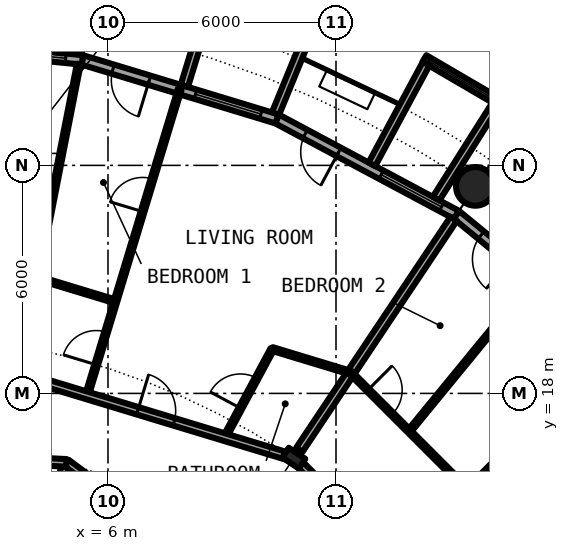
"""IFC4 building model, lengths in metres.
Left out: names, types, materials, properties, quantities, classifications, styles, units other than length and angle.
Written with IfcOpenShell. Run it as: python <this file> out.ifc"""

import sys

from ifc_helpers import new_model, si_unit, direction, frame, frame_2d, origin, origin_2d, place, context, subcontext, project, spatial, rectangle, circle, hollow_circle, i_section, extrude, element, fill, save


model = new_model("IFC4")
c1 = context("Model", 3, precision=1e-05, world=origin(), true_north=direction((0.0, 1.0)))
c2 = subcontext(c1, "Body", "Model", "MODEL_VIEW")
j1 = project(units=[si_unit("LENGTHUNIT", "METRE"), si_unit("PLANEANGLEUNIT", "RADIAN")], contexts=[c1])
p1 = place(None, origin())
s1 = spatial("IfcSite", under=j1, at=p1, CompositionType="ELEMENT")
p2 = place(p1, origin())
s2 = spatial("IfcBuilding", under=s1, at=p2, CompositionType="ELEMENT")
p3 = place(p2, frame((0.0, 0.0, 91.05)))
s3 = spatial("IfcBuildingStorey", under=s2, at=p3, CompositionType="ELEMENT", Elevation=91.05)
p4 = place(p3, frame((15.667, 23.448, 0.0), z_axis=(0.0, 0.0, 1.0), x_axis=(1.0, 0.0, 0.0)))
e1 = element("IfcColumn", 1, at=p4, inside=s3, PredefinedType="COLUMN", context=c2, shape_type="SweptSolid", body=[
    extrude(hollow_circle(Radius=0.508, WallThickness=0.04, at=origin_2d()), origin(), (0.0, 0.0, 1.0), 3.05),
])
p5 = place(p3, frame((10.889, 16.297, 0.0), z_axis=(0.0, 0.0, 1.0), x_axis=(0.55557023302, 0.831469612303, 0.0)))
e2 = element("IfcColumn", 2, at=p5, inside=s3, PredefinedType="COLUMN", context=c2, shape_type="SweptSolid", body=[
    extrude(i_section(OverallWidth=0.306, OverallDepth=0.524, WebThickness=0.021, FlangeThickness=0.04, FilletRadius=0.027, at=origin_2d()), origin(), (0.0, 0.0, 1.0), 3.05),
])
p6 = place(p3, frame((19.304, 19.304, 0.0), z_axis=(0.0, 0.0, 1.0), x_axis=(-0.773019449054, 0.634382322723, 0.0)))
e3 = element("IfcWall", 3, at=p6, inside=s3, PredefinedType="SOLIDWALL", context=c2, shape_type="SweptSolid", body=[
    extrude(rectangle(XDim=5.352, YDim=0.25, at=frame_2d((2.676, 0.0))), origin(), (0.0, 0.0, 1.0), 2.7),
])
p7 = place(p6, frame((0.441, 0.0, 0.3)))
e4 = element("IfcOpeningElement", 4, at=p7, cuts=e3, PredefinedType="OPENING", context=c2, shape_type="SweptSolid", body=[
    extrude(rectangle(XDim=1.8, YDim=2.1, at=frame_2d((0.9, 1.05))), frame((0.0, 0.135, 0.0), z_axis=(0.0, -1.0, 0.0), x_axis=(1.0, 0.0, 0.0)), (0.0, 0.0, 1.0), 0.27),
])
p8 = place(p6, frame((3.51, 0.0, 0.0)))
e5 = element("IfcOpeningElement", 5, at=p8, cuts=e3, PredefinedType="OPENING", context=c2, shape_type="SweptSolid", body=[
    extrude(rectangle(XDim=1.0, YDim=2.2, at=frame_2d((0.5, 1.1))), frame((0.0, 0.135, 0.0), z_axis=(0.0, -1.0, 0.0), x_axis=(1.0, 0.0, 0.0)), (0.0, 0.0, 1.0), 0.27),
])
p9 = place(p3, frame((15.167, 22.699, 0.0), z_axis=(0.0, 0.0, 1.0), x_axis=(-0.881915646801, 0.471407246368, 0.0)))
e6 = element("IfcWall", 6, at=p9, inside=s3, PredefinedType="SOLIDWALL", context=c2, shape_type="SweptSolid", body=[
    extrude(rectangle(XDim=5.352, YDim=0.25, at=frame_2d((2.676, 0.0))), origin(), (0.0, 0.0, 1.0), 2.7),
])
p10 = place(p9, frame((0.441, 0.0, 0.3)))
e7 = element("IfcOpeningElement", 7, at=p10, cuts=e6, PredefinedType="OPENING", context=c2, shape_type="SweptSolid", body=[
    extrude(rectangle(XDim=1.8, YDim=2.1, at=frame_2d((0.9, 1.05))), frame((0.0, 0.135, 0.0), z_axis=(0.0, -1.0, 0.0), x_axis=(1.0, 0.0, 0.0)), (0.0, 0.0, 1.0), 0.27),
])
p11 = place(p9, frame((3.51, 0.0, 0.0)))
e8 = element("IfcOpeningElement", 8, at=p11, cuts=e6, PredefinedType="OPENING", context=c2, shape_type="SweptSolid", body=[
    extrude(rectangle(XDim=1.0, YDim=2.2, at=frame_2d((0.5, 1.1))), frame((0.0, 0.135, 0.0), z_axis=(0.0, -1.0, 0.0), x_axis=(1.0, 0.0, 0.0)), (0.0, 0.0, 1.0), 0.27),
])
p12 = place(p3, frame((16.344, 25.633, -0.03), z_axis=(0.0, 0.0, 1.0), x_axis=(-0.863346521872, 0.504611517081, 0.0)))
e9 = element("IfcWall", 9, at=p12, inside=s3, PredefinedType="SOLIDWALL", context=c2, shape_type="SweptSolid", body=[
    extrude(rectangle(XDim=2.336, YDim=0.2, at=frame_2d((1.168, 0.0))), origin(), (0.0, 0.0, 1.0), 2.73),
])
p13 = place(p12, frame((0.128, 0.0, 0.33)))
e10 = element("IfcOpeningElement", 10, at=p13, cuts=e9, PredefinedType="OPENING", context=c2, shape_type="SweptSolid", body=[
    extrude(circle(Radius=1.04, at=frame_2d((1.04, 1.04))), frame((0.0, 0.11, 0.0), z_axis=(0.0, -1.0, 0.0), x_axis=(1.0, 0.0, 0.0)), (0.0, 0.0, 1.0), 0.22),
])
p14 = place(p3, frame((14.635, 23.126, -0.03), z_axis=(0.0, 0.0, 1.0), x_axis=(0.534437802731, 0.845207805816, 0.0)))
e11 = element("IfcWall", 11, at=p14, inside=s3, PredefinedType="SOLIDWALL", context=c2, shape_type="SweptSolid", body=[
    extrude(rectangle(XDim=2.932, YDim=0.2, at=frame_2d((1.466, 0.0))), origin(), (0.0, 0.0, 1.0), 2.73),
])
p15 = place(p3, frame((12.945, 24.029, -0.03), z_axis=(0.0, 0.0, 1.0), x_axis=(0.474424310775, 0.88029629861, 0.0)))
e12 = element("IfcWall", 12, at=p15, inside=s3, PredefinedType="SOLIDWALL", context=c2, shape_type="SweptSolid", body=[
    extrude(rectangle(XDim=3.006, YDim=0.2, at=frame_2d((1.503, 0.0))), origin(), (0.0, 0.0, 1.0), 2.73),
])
p16 = place(p3, frame((10.447, 25.222, 0.0), z_axis=(0.0, 0.0, 1.0), x_axis=(-0.956965678721, 0.290201119486, 0.0)))
e13 = element("IfcWall", 13, at=p16, inside=s3, PredefinedType="SOLIDWALL", context=c2, shape_type="SweptSolid", body=[
    extrude(rectangle(XDim=5.351, YDim=0.25, at=frame_2d((2.676, 0.0))), origin(), (0.0, 0.0, 1.0), 2.7),
])
p17 = place(p16, frame((0.441, 0.0, 0.3)))
e14 = element("IfcOpeningElement", 14, at=p17, cuts=e13, PredefinedType="OPENING", context=c2, shape_type="SweptSolid", body=[
    extrude(rectangle(XDim=1.8, YDim=2.1, at=frame_2d((0.9, 1.05))), frame((0.0, 0.135, 0.0), z_axis=(0.0, -1.0, 0.0), x_axis=(1.0, 0.0, 0.0)), (0.0, 0.0, 1.0), 0.27),
])
p18 = place(p16, frame((3.51, 0.0, 0.0)))
e15 = element("IfcOpeningElement", 15, at=p18, cuts=e13, PredefinedType="OPENING", context=c2, shape_type="SweptSolid", body=[
    extrude(rectangle(XDim=1.0, YDim=2.2, at=frame_2d((0.5, 1.1))), frame((0.0, 0.135, 0.0), z_axis=(0.0, -1.0, 0.0), x_axis=(1.0, 0.0, 0.0)), (0.0, 0.0, 1.0), 0.27),
])
p19 = place(p3, frame((10.409, 25.364, -0.03), z_axis=(0.0, 0.0, 1.0), x_axis=(0.379509886562, 0.925187681501, 0.0)))
e16 = element("IfcWall", 16, at=p19, inside=s3, PredefinedType="SOLIDWALL", context=c2, shape_type="SweptSolid", body=[
    extrude(rectangle(XDim=2.883, YDim=0.2, at=frame_2d((1.441, 0.0))), origin(), (0.0, 0.0, 1.0), 2.73),
])
p20 = place(p3, frame((8.009, 26.092, -0.03), z_axis=(0.0, 0.0, 1.0), x_axis=(0.293406695073, 0.955987715029, 0.0)))
e17 = element("IfcWall", 17, at=p20, inside=s3, PredefinedType="SOLIDWALL", context=c2, shape_type="SweptSolid", body=[
    extrude(rectangle(XDim=3.006, YDim=0.2, at=frame_2d((1.503, 0.0))), origin(), (0.0, 0.0, 1.0), 2.73),
])
p21 = place(p3, frame((5.326, 26.775, 0.0), z_axis=(0.0, 0.0, 1.0), x_axis=(-0.995173996315, 0.098126026407, 0.0)))
e18 = element("IfcWall", 18, at=p21, inside=s3, PredefinedType="SOLIDWALL", context=c2, shape_type="SweptSolid", body=[
    extrude(rectangle(XDim=5.352, YDim=0.25, at=frame_2d((2.676, 0.0))), origin(), (0.0, 0.0, 1.0), 2.7),
])
p22 = place(p21, frame((0.441, 0.0, 0.3)))
e19 = element("IfcOpeningElement", 19, at=p22, cuts=e18, PredefinedType="OPENING", context=c2, shape_type="SweptSolid", body=[
    extrude(rectangle(XDim=1.8, YDim=2.1, at=frame_2d((0.9, 1.05))), frame((0.0, 0.135, 0.0), z_axis=(0.0, -1.0, 0.0), x_axis=(1.0, 0.0, 0.0)), (0.0, 0.0, 1.0), 0.27),
])
p23 = place(p21, frame((3.51, 0.0, 0.0)))
e20 = element("IfcOpeningElement", 20, at=p23, cuts=e18, PredefinedType="OPENING", context=c2, shape_type="SweptSolid", body=[
    extrude(rectangle(XDim=1.0, YDim=2.2, at=frame_2d((0.5, 1.1))), frame((0.0, 0.135, 0.0), z_axis=(0.0, -1.0, 0.0), x_axis=(1.0, 0.0, 0.0)), (0.0, 0.0, 1.0), 0.27),
])
p24 = place(p3, frame((4.671, 26.966, -0.03), z_axis=(0.0, 0.0, 1.0), x_axis=(0.170539878907, 0.985350774954, 0.0)))
e21 = element("IfcWall", 21, at=p24, inside=s3, PredefinedType="SOLIDWALL", context=c2, shape_type="SweptSolid", body=[
    extrude(rectangle(XDim=2.932, YDim=0.2, at=frame_2d((1.466, 0.0))), origin(), (0.0, 0.0, 1.0), 2.73),
])
p25 = place(p3, frame((2.243, 7.387, 0.0), z_axis=(0.0, 0.0, 1.0), x_axis=(0.290196345171, 0.956967126525, 0.0)))
e22 = element("IfcWall", 22, at=p25, inside=s3, PredefinedType="PARTITIONING", context=c2, shape_type="SweptSolid", body=[
    extrude(rectangle(XDim=9.18, YDim=0.2, at=frame_2d((4.59, 0.0))), origin(), (0.0, 0.0, 1.0), 2.7),
])
p26 = place(p3, frame((4.13, 21.047, 0.0), z_axis=(0.0, 0.0, 1.0), x_axis=(0.192433779325, 0.981309961518, 0.0)))
e23 = element("IfcWall", 23, at=p26, inside=s3, PredefinedType="PARTITIONING", context=c2, shape_type="SweptSolid", body=[
    extrude(rectangle(XDim=5.727, YDim=0.1, at=frame_2d((2.863, 0.0))), origin(), (0.0, 0.0, 1.0), 2.7),
])
p27 = place(p26, frame((2.414, 0.0, 0.0)))
e24 = element("IfcOpeningElement", 24, at=p27, cuts=e23, PredefinedType="OPENING", context=c2, shape_type="SweptSolid", body=[
    extrude(rectangle(XDim=0.9, YDim=2.3, at=frame_2d((0.45, 1.15))), frame((0.0, 0.06, 0.0), z_axis=(0.0, -1.0, 0.0), x_axis=(1.0, 0.0, 0.0)), (0.0, 0.0, 1.0), 0.12),
])
p28 = place(p3, frame((5.445, 17.948, 0.0), z_axis=(0.0, 0.0, 1.0), x_axis=(0.290158700753, 0.956978541231, 0.0)))
e25 = element("IfcWall", 25, at=p28, inside=s3, PredefinedType="PARTITIONING", context=c2, shape_type="SweptSolid", body=[
    extrude(rectangle(XDim=8.419, YDim=0.1, at=frame_2d((4.209, 0.0))), origin(), (0.0, 0.0, 1.0), 2.7),
])
p29 = place(p28, frame((0.842, 0.0, 0.0)))
e26 = element("IfcOpeningElement", 26, at=p29, cuts=e25, PredefinedType="OPENING", context=c2, shape_type="SweptSolid", body=[
    extrude(rectangle(XDim=0.9, YDim=2.3, at=frame_2d((0.45, 1.15))), frame((0.0, 0.06, 0.0), z_axis=(0.0, -1.0, 0.0), x_axis=(1.0, 0.0, 0.0)), (0.0, 0.0, 1.0), 0.12),
])
p30 = place(p28, frame((5.052, 0.0, 0.0)))
e27 = element("IfcOpeningElement", 27, at=p30, cuts=e25, PredefinedType="OPENING", context=c2, shape_type="SweptSolid", body=[
    extrude(rectangle(XDim=0.9, YDim=2.3, at=frame_2d((0.45, 1.15))), frame((0.0, 0.06, 0.0), z_axis=(0.0, -1.0, 0.0), x_axis=(1.0, 0.0, 0.0)), (0.0, 0.0, 1.0), 0.12),
])
p31 = place(p3, frame((9.074, 16.847, 0.0), z_axis=(0.0, 0.0, 1.0), x_axis=(0.474160570331, 0.880438387136, 0.0)))
e28 = element("IfcWall", 28, at=p31, inside=s3, PredefinedType="PARTITIONING", context=c2, shape_type="SweptSolid", body=[
    extrude(rectangle(XDim=2.636, YDim=0.1, at=frame_2d((1.318, 0.0))), origin(), (0.0, 0.0, 1.0), 2.7),
])
p32 = place(p31, frame((0.868, 0.0, 0.0)))
e29 = element("IfcOpeningElement", 29, at=p32, cuts=e28, PredefinedType="OPENING", context=c2, shape_type="SweptSolid", body=[
    extrude(rectangle(XDim=0.9, YDim=2.3, at=frame_2d((0.45, 1.15))), frame((0.0, 0.06, 0.0), z_axis=(0.0, -1.0, 0.0), x_axis=(1.0, 0.0, 0.0)), (0.0, 0.0, 1.0), 0.12),
])
p33 = place(p3, frame((11.035, 16.515, 0.0), z_axis=(0.0, 0.0, 1.0), x_axis=(0.555516661303, 0.831505405283, 0.0)))
e30 = element("IfcWall", 30, at=p33, inside=s3, PredefinedType="PARTITIONING", context=c2, shape_type="SweptSolid", body=[
    extrude(rectangle(XDim=7.312, YDim=0.2, at=frame_2d((3.656, 0.0))), origin(), (0.0, 0.0, 1.0), 2.7),
])
p34 = place(p3, frame((13.927, 17.004, 0.0), z_axis=(0.0, 0.0, 1.0), x_axis=(0.633774976367, 0.773517471898, 0.0)))
e31 = element("IfcWall", 31, at=p34, inside=s3, PredefinedType="PARTITIONING", context=c2, shape_type="SweptSolid", body=[
    extrude(rectangle(XDim=5.196, YDim=0.1, at=frame_2d((2.598, 0.0))), origin(), (0.0, 0.0, 1.0), 2.7),
])
p35 = place(p3, frame((15.465, 15.465, 0.0), z_axis=(0.0, 0.0, 1.0), x_axis=(0.707106781187, 0.707106781187, 0.0)))
e32 = element("IfcWall", 32, at=p35, inside=s3, PredefinedType="PARTITIONING", context=c2, shape_type="SweptSolid", body=[
    extrude(rectangle(XDim=5.305, YDim=0.1, at=frame_2d((2.652, 0.0))), origin(), (0.0, 0.0, 1.0), 2.7),
])
p36 = place(p35, frame((2.202, 0.0, 0.0)))
e33 = element("IfcOpeningElement", 33, at=p36, cuts=e32, PredefinedType="OPENING", context=c2, shape_type="SweptSolid", body=[
    extrude(rectangle(XDim=0.9, YDim=2.3, at=frame_2d((0.45, 1.15))), frame((0.0, 0.06, 0.0), z_axis=(0.0, -1.0, 0.0), x_axis=(1.0, 0.0, 0.0)), (0.0, 0.0, 1.0), 0.12),
])
p37 = place(p3, frame((4.906, 16.172, 0.0), z_axis=(0.0, 0.0, 1.0), x_axis=(0.803191461888, -0.595720971219, 0.0)))
e34 = element("IfcWall", 34, at=p37, inside=s3, PredefinedType="PARTITIONING", context=c2, shape_type="SweptSolid", body=[
    extrude(rectangle(XDim=9.76, YDim=0.2, at=frame_2d((4.88, 0.0))), origin(), (0.0, 0.0, 1.0), 2.7),
])
p38 = place(p37, frame((4.38, 0.0, 0.0)))
e35 = element("IfcOpeningElement", 35, at=p38, cuts=e34, PredefinedType="OPENING", context=c2, shape_type="SweptSolid", body=[
    extrude(rectangle(XDim=1.0, YDim=2.3, at=frame_2d((0.5, 1.15))), frame((0.0, 0.11, 0.0), z_axis=(0.0, -1.0, 0.0), x_axis=(1.0, 0.0, 0.0)), (0.0, 0.0, 1.0), 0.22),
])
p39 = place(p3, frame((-3.298, 16.574, 0.0), z_axis=(0.0, 0.0, 1.0), x_axis=(0.998802523271, -0.048923608895, 0.0)))
e36 = element("IfcWall", 36, at=p39, inside=s3, PredefinedType="PARTITIONING", context=c2, shape_type="SweptSolid", body=[
    extrude(rectangle(XDim=8.214, YDim=0.2, at=frame_2d((4.107, 0.0))), origin(), (0.0, 0.0, 1.0), 2.7),
])
p40 = place(p39, frame((3.6, 0.0, 0.0)))
e37 = element("IfcOpeningElement", 37, at=p40, cuts=e36, PredefinedType="OPENING", context=c2, shape_type="SweptSolid", body=[
    extrude(rectangle(XDim=1.0, YDim=2.3, at=frame_2d((0.5, 1.15))), frame((0.0, 0.11, 0.0), z_axis=(0.0, -1.0, 0.0), x_axis=(1.0, 0.0, 0.0)), (0.0, 0.0, 1.0), 0.22),
])
p41 = place(p3, frame((-0.007, 19.599, 0.0), z_axis=(0.0, 0.0, 1.0), x_axis=(0.95700958731, -0.290056287291, 0.0)))
e38 = element("IfcWall", 38, at=p41, inside=s3, PredefinedType="PARTITIONING", context=c2, shape_type="SweptSolid", body=[
    extrude(rectangle(XDim=11.226, YDim=0.2, at=frame_2d((5.613, 0.0))), origin(), (0.0, 0.0, 1.0), 2.38),
])
p42 = place(p41, frame((7.093, 0.0, 0.0)))
e39 = element("IfcOpeningElement", 39, at=p42, cuts=e38, PredefinedType="OPENING", context=c2, shape_type="SweptSolid", body=[
    extrude(rectangle(XDim=1.0, YDim=2.3, at=frame_2d((0.5, 1.15))), frame((0.0, 0.11, 0.0), z_axis=(0.0, -1.0, 0.0), x_axis=(1.0, 0.0, 0.0)), (0.0, 0.0, 1.0), 0.22),
])
p43 = place(p3, frame((11.0, 16.186, 0.0), z_axis=(0.0, 0.0, 1.0), x_axis=(0.707106781187, -0.707106781187, 0.0)))
e40 = element("IfcWall", 40, at=p43, inside=s3, PredefinedType="PARTITIONING", context=c2, shape_type="SweptSolid", body=[
    extrude(rectangle(XDim=7.334, YDim=0.2, at=frame_2d((3.667, 0.0))), origin(), (0.0, 0.0, 1.0), 2.38),
])
p44 = place(p43, frame((2.211, 0.0, 0.0)))
e41 = element("IfcOpeningElement", 41, at=p44, cuts=e40, PredefinedType="OPENING", context=c2, shape_type="SweptSolid", body=[
    extrude(rectangle(XDim=1.0, YDim=2.3, at=frame_2d((0.5, 1.15))), frame((0.0, 0.11, 0.0), z_axis=(0.0, -1.0, 0.0), x_axis=(1.0, 0.0, 0.0)), (0.0, 0.0, 1.0), 0.22),
])
p45 = place(p3, frame((-0.004, 22.299, 0.0), z_axis=(0.0, 0.0, 1.0), x_axis=(0.95699555343, -0.290102586537, 0.0)))
e42 = element("IfcWall", 42, at=p45, inside=s3, PredefinedType="PARTITIONING", context=c2, shape_type="SweptSolid", body=[
    extrude(rectangle(XDim=6.478, YDim=0.1, at=frame_2d((3.239, 0.0))), origin(), (0.0, 0.0, 1.0), 2.7),
])
p46 = place(p3, frame((10.324, 19.168, 0.0), z_axis=(0.0, 0.0, 1.0), x_axis=(0.956993947591, -0.290107883852, 0.0)))
e43 = element("IfcWall", 43, at=p46, inside=s3, PredefinedType="PARTITIONING", context=c2, shape_type="SweptSolid", body=[
    extrude(rectangle(XDim=2.158, YDim=0.1, at=frame_2d((1.079, 0.0))), origin(), (0.0, 0.0, 1.0), 2.7),
])
p47 = place(p3, frame((12.389, 18.542, 0.0), z_axis=(0.0, 0.0, 1.0), x_axis=(0.707022606819, -0.707190945535, 0.0)))
e44 = element("IfcWall", 44, at=p47, inside=s3, PredefinedType="PARTITIONING", context=c2, shape_type="SweptSolid", body=[
    extrude(rectangle(XDim=4.351, YDim=0.1, at=frame_2d((2.175, 0.0))), origin(), (0.0, 0.0, 1.0), 2.7),
])
p48 = place(p47, frame((0.639, 0.0, 0.0)))
e45 = element("IfcOpeningElement", 45, at=p48, cuts=e44, PredefinedType="OPENING", context=c2, shape_type="SweptSolid", body=[
    extrude(rectangle(XDim=0.9, YDim=2.3, at=frame_2d((0.45, 1.15))), frame((0.0, 0.06, 0.0), z_axis=(0.0, -1.0, 0.0), x_axis=(1.0, 0.0, 0.0)), (0.0, 0.0, 1.0), 0.12),
])
p49 = place(p8, origin())
e46 = element("IfcDoor", 46, at=p49, inside=s3, OperationType="SINGLE_SWING_LEFT", PredefinedType="DOOR", context=c2, shape_type="SweptSolid", body=[
    extrude(rectangle(XDim=1.0, YDim=2.2, at=frame_2d((0.5, 1.1))), frame((0.0, 0.025, 0.0), z_axis=(0.0, -1.0, 0.0), x_axis=(1.0, 0.0, 0.0)), (0.0, 0.0, 1.0), 0.05),
])
fill(e5, e46)
p50 = place(p10, origin())
e47 = element("IfcWindow", 47, at=p50, inside=s3, PartitioningType="SINGLE_PANEL", PredefinedType="WINDOW", context=c2, shape_type="SweptSolid", body=[
    extrude(rectangle(XDim=1.8, YDim=2.1, at=frame_2d((0.9, 1.05))), frame((0.0, 0.03, 0.0), z_axis=(0.0, -1.0, 0.0), x_axis=(1.0, 0.0, 0.0)), (0.0, 0.0, 1.0), 0.06),
])
fill(e7, e47)
p51 = place(p13, origin())
e48 = element("IfcWindow", 48, at=p51, inside=s3, PartitioningType="SINGLE_PANEL", PredefinedType="WINDOW", context=c2, shape_type="SweptSolid", body=[
    extrude(circle(Radius=1.04, at=frame_2d((1.04, 1.04))), frame((0.0, 0.03, 0.0), z_axis=(0.0, -1.0, 0.0), x_axis=(1.0, 0.0, 0.0)), (0.0, 0.0, 1.0), 0.06),
])
fill(e10, e48)
p52 = place(p11, origin())
e49 = element("IfcDoor", 49, at=p52, inside=s3, OperationType="SINGLE_SWING_LEFT", PredefinedType="DOOR", context=c2, shape_type="SweptSolid", body=[
    extrude(rectangle(XDim=1.0, YDim=2.2, at=frame_2d((0.5, 1.1))), frame((0.0, 0.025, 0.0), z_axis=(0.0, -1.0, 0.0), x_axis=(1.0, 0.0, 0.0)), (0.0, 0.0, 1.0), 0.05),
])
fill(e8, e49)
p53 = place(p17, origin())
e50 = element("IfcWindow", 50, at=p53, inside=s3, PartitioningType="SINGLE_PANEL", PredefinedType="WINDOW", context=c2, shape_type="SweptSolid", body=[
    extrude(rectangle(XDim=1.8, YDim=2.1, at=frame_2d((0.9, 1.05))), frame((0.0, 0.03, 0.0), z_axis=(0.0, -1.0, 0.0), x_axis=(1.0, 0.0, 0.0)), (0.0, 0.0, 1.0), 0.06),
])
fill(e14, e50)
p54 = place(p18, origin())
e51 = element("IfcDoor", 51, at=p54, inside=s3, OperationType="SINGLE_SWING_LEFT", PredefinedType="DOOR", context=c2, shape_type="SweptSolid", body=[
    extrude(rectangle(XDim=1.0, YDim=2.2, at=frame_2d((0.5, 1.1))), frame((0.0, 0.025, 0.0), z_axis=(0.0, -1.0, 0.0), x_axis=(1.0, 0.0, 0.0)), (0.0, 0.0, 1.0), 0.05),
])
fill(e15, e51)
p55 = place(p22, origin())
e52 = element("IfcWindow", 52, at=p55, inside=s3, PartitioningType="SINGLE_PANEL", PredefinedType="WINDOW", context=c2, shape_type="SweptSolid", body=[
    extrude(rectangle(XDim=1.8, YDim=2.1, at=frame_2d((0.9, 1.05))), frame((0.0, 0.03, 0.0), z_axis=(0.0, -1.0, 0.0), x_axis=(1.0, 0.0, 0.0)), (0.0, 0.0, 1.0), 0.06),
])
fill(e19, e52)
p56 = place(p48, origin())
e53 = element("IfcDoor", 53, at=p56, inside=s3, OperationType="SINGLE_SWING_LEFT", PredefinedType="DOOR", context=c2, shape_type="SweptSolid", body=[
    extrude(rectangle(XDim=0.9, YDim=2.3, at=frame_2d((0.45, 1.15))), frame((0.0, 0.025, 0.0), z_axis=(0.0, -1.0, 0.0), x_axis=(1.0, 0.0, 0.0)), (0.0, 0.0, 1.0), 0.05),
])
fill(e45, e53)
p57 = place(p42, origin())
e54 = element("IfcDoor", 54, at=p57, inside=s3, OperationType="SINGLE_SWING_RIGHT", PredefinedType="DOOR", context=c2, shape_type="SweptSolid", body=[
    extrude(rectangle(XDim=1.0, YDim=2.3, at=frame_2d((0.5, 1.15))), frame((0.0, 0.025, 0.0), z_axis=(0.0, -1.0, 0.0), x_axis=(1.0, 0.0, 0.0)), (0.0, 0.0, 1.0), 0.05),
])
fill(e39, e54)
p58 = place(p32, origin())
e55 = element("IfcDoor", 55, at=p58, inside=s3, OperationType="SINGLE_SWING_RIGHT", PredefinedType="DOOR", context=c2, shape_type="SweptSolid", body=[
    extrude(rectangle(XDim=0.9, YDim=2.3, at=frame_2d((0.45, 1.15))), frame((0.0, 0.025, 0.0), z_axis=(0.0, -1.0, 0.0), x_axis=(1.0, 0.0, 0.0)), (0.0, 0.0, 1.0), 0.05),
])
fill(e29, e55)
p59 = place(p29, origin())
e56 = element("IfcDoor", 56, at=p59, inside=s3, OperationType="SINGLE_SWING_LEFT", PredefinedType="DOOR", context=c2, shape_type="SweptSolid", body=[
    extrude(rectangle(XDim=0.9, YDim=2.3, at=frame_2d((0.45, 1.15))), frame((0.0, 0.025, 0.0), z_axis=(0.0, -1.0, 0.0), x_axis=(1.0, 0.0, 0.0)), (0.0, 0.0, 1.0), 0.05),
])
fill(e26, e56)
p60 = place(p30, origin())
e57 = element("IfcDoor", 57, at=p60, inside=s3, OperationType="SINGLE_SWING_RIGHT", PredefinedType="DOOR", context=c2, shape_type="SweptSolid", body=[
    extrude(rectangle(XDim=0.9, YDim=2.3, at=frame_2d((0.45, 1.15))), frame((0.0, 0.025, 0.0), z_axis=(0.0, -1.0, 0.0), x_axis=(1.0, 0.0, 0.0)), (0.0, 0.0, 1.0), 0.05),
])
fill(e27, e57)
p61 = place(p27, origin())
e58 = element("IfcDoor", 58, at=p61, inside=s3, OperationType="SINGLE_SWING_RIGHT", PredefinedType="DOOR", context=c2, shape_type="SweptSolid", body=[
    extrude(rectangle(XDim=0.9, YDim=2.3, at=frame_2d((0.45, 1.15))), frame((0.0, 0.025, 0.0), z_axis=(0.0, -1.0, 0.0), x_axis=(1.0, 0.0, 0.0)), (0.0, 0.0, 1.0), 0.05),
])
fill(e24, e58)
save(model, sys.argv[1])
